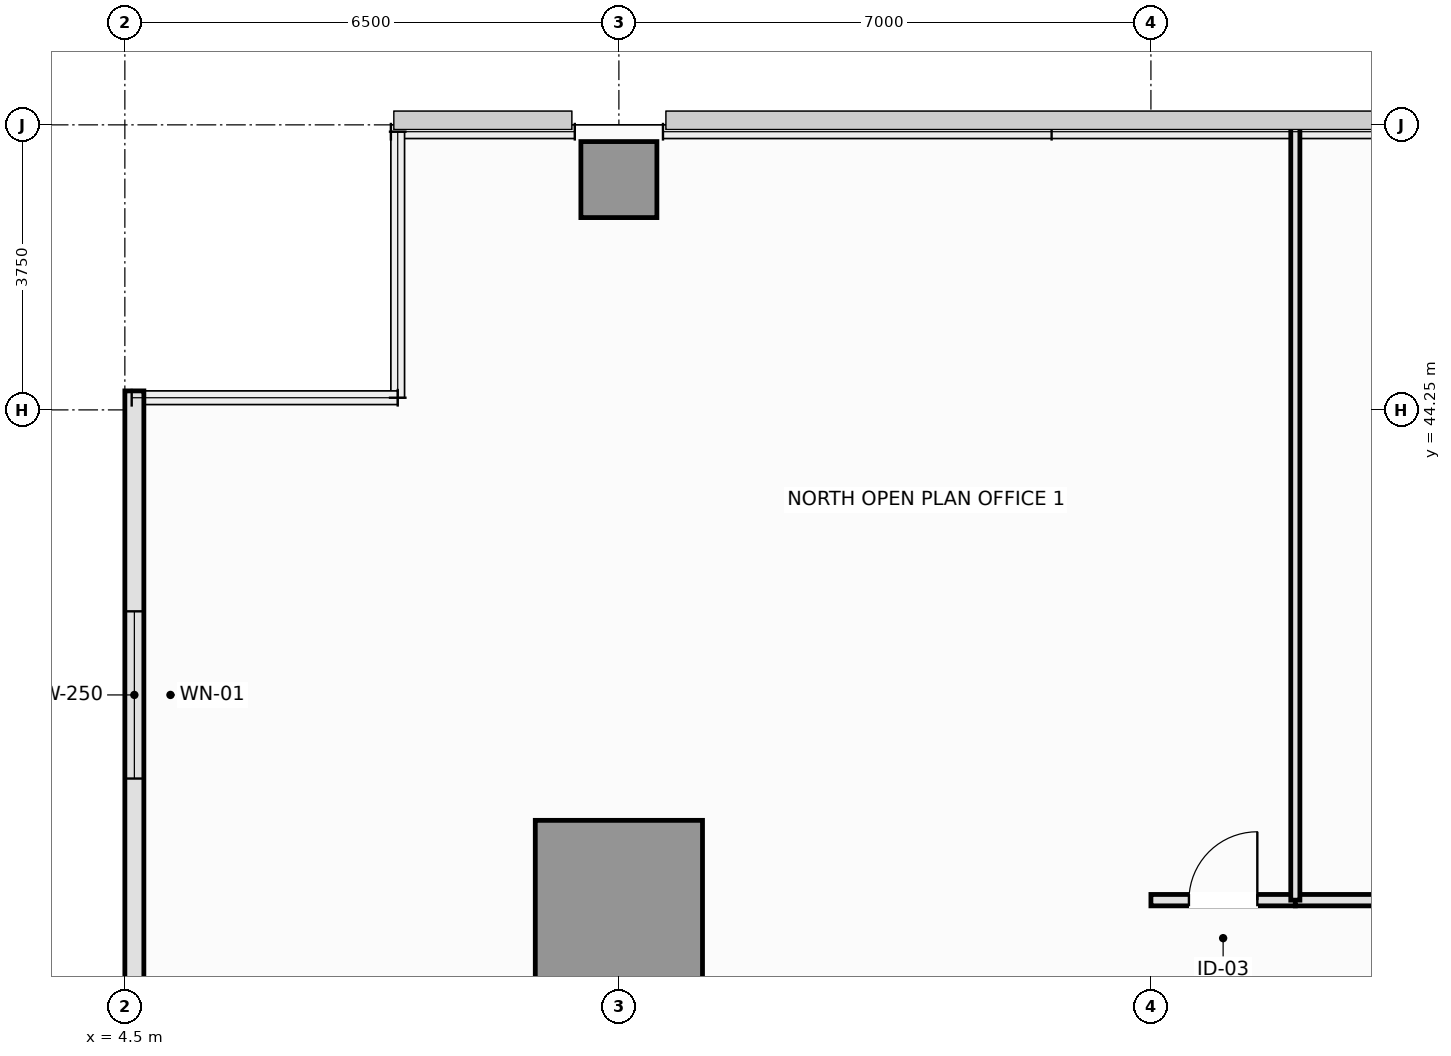
"""IFC4 building model, lengths in metres.
Left out: names, types, materials, properties, quantities, classifications, styles, units other than length and angle.
Written with IfcOpenShell. Run it as: python <this file> out.ifc"""

import sys

from ifc_helpers import new_model, si_unit, direction, frame, frame_2d, origin, origin_2d, place, context, subcontext, project, spatial, rectangle, extrude, element, fill, save


model = new_model("IFC4")
c1 = context("Model", 3, precision=1e-05, world=origin(), true_north=direction((0.0, 1.0)))
c2 = subcontext(c1, "Body", "Model", "MODEL_VIEW")
j1 = project(units=[si_unit("LENGTHUNIT", "METRE"), si_unit("PLANEANGLEUNIT", "RADIAN")], contexts=[c1])
p1 = place(None, origin())
s1 = spatial("IfcSite", under=j1, at=p1, CompositionType="ELEMENT")
p2 = place(p1, origin())
s2 = spatial("IfcBuilding", under=s1, at=p2, CompositionType="ELEMENT")
p3 = place(p2, frame((0.0, 0.0, 61.1)))
s3 = spatial("IfcBuildingStorey", under=s2, at=p3, CompositionType="ELEMENT", Elevation=61.1)
p4 = place(p3, frame((11.0, 37.75, 0.0), z_axis=(0.0, 0.0, 1.0), x_axis=(1.0, 0.0, 0.0)))
e1 = element("IfcColumn", 1, at=p4, inside=s3, PredefinedType="COLUMN", context=c2, shape_type="SweptSolid", body=[
    extrude(rectangle(XDim=2.2, YDim=2.2, at=origin_2d()), origin(), (0.0, 0.0, 1.0), 3.55),
])
p5 = place(p3, frame((11.0, 47.28, 0.0), z_axis=(0.0, 0.0, 1.0), x_axis=(1.0, 0.0, 0.0)))
e2 = element("IfcColumn", 2, at=p5, inside=s3, PredefinedType="COLUMN", context=c2, shape_type="SweptSolid", body=[
    extrude(rectangle(XDim=1.0, YDim=1.0, at=origin_2d()), origin(), (0.0, 0.0, 1.0), 3.55),
])
p6 = place(p3, frame((4.625, 44.5, 0.0), z_axis=(0.0, 0.0, 1.0), x_axis=(0.0, -1.0, 0.0)))
e3 = element("IfcWall", 3, at=p6, inside=s3, PredefinedType="SOLIDWALL", context=c2, shape_type="SweptSolid", body=[
    extrude(rectangle(XDim=8.0, YDim=0.25, at=frame_2d((4.0, 0.0))), origin(), (0.0, 0.0, 1.0), 3.37),
])
p7 = place(p6, frame((2.9, 0.0, 0.9)))
e4 = element("IfcOpeningElement", 4, at=p7, cuts=e3, PredefinedType="OPENING", context=c2, shape_type="SweptSolid", body=[
    extrude(rectangle(XDim=2.2, YDim=1.8, at=frame_2d((1.1, 0.9))), frame((0.0, 0.135, 0.0), z_axis=(0.0, -1.0, 0.0), x_axis=(1.0, 0.0, 0.0)), (0.0, 0.0, 1.0), 0.27),
])
p8 = place(p3, frame((18.0, 37.8, 0.0), z_axis=(0.0, 0.0, 1.0), x_axis=(1.0, 0.0, 0.0)))
e5 = element("IfcWall", 5, at=p8, inside=s3, PredefinedType="PARTITIONING", context=c2, shape_type="SweptSolid", body=[
    extrude(rectangle(XDim=1.9, YDim=0.15, at=frame_2d((0.95, 0.0))), origin(), (0.0, 0.0, 1.0), 2.72),
])
p9 = place(p8, frame((0.5, 0.0, 0.0)))
e6 = element("IfcOpeningElement", 6, at=p9, cuts=e5, PredefinedType="OPENING", context=c2, shape_type="SweptSolid", body=[
    extrude(rectangle(XDim=0.9, YDim=2.1, at=frame_2d((0.45, 1.05))), frame((0.0, 0.085, 0.0), z_axis=(0.0, -1.0, 0.0), x_axis=(1.0, 0.0, 0.0)), (0.0, 0.0, 1.0), 0.17),
])
p10 = place(p3, frame((19.9, 37.8, 0.0), z_axis=(0.0, 0.0, 1.0), x_axis=(1.0, 0.0, 0.0)))
e7 = element("IfcWall", 7, at=p10, inside=s3, PredefinedType="PARTITIONING", context=c2, shape_type="SweptSolid", body=[
    extrude(rectangle(XDim=3.7, YDim=0.15, at=frame_2d((1.85, 0.0))), origin(), (0.0, 0.0, 1.0), 2.72),
])
p11 = place(p10, frame((1.35, 0.0, 0.0)))
e8 = element("IfcOpeningElement", 8, at=p11, cuts=e7, PredefinedType="OPENING", context=c2, shape_type="SweptSolid", body=[
    extrude(rectangle(XDim=1.0, YDim=2.15, at=frame_2d((0.5, 1.075))), frame((0.0, 0.085, 0.0), z_axis=(0.0, -1.0, 0.0), x_axis=(1.0, 0.0, 0.0)), (0.0, 0.0, 1.0), 0.17),
])
p12 = place(p3, frame((19.9, 37.8, 0.0), z_axis=(0.0, 0.0, 1.0), x_axis=(0.0, 1.0, 0.0)))
e9 = element("IfcWall", 9, at=p12, inside=s3, PredefinedType="PARTITIONING", context=c2, shape_type="SweptSolid", body=[
    extrude(rectangle(XDim=10.19, YDim=0.12, at=frame_2d((5.095, 0.0))), origin(), (0.0, 0.0, 1.0), 3.37),
])
p13 = place(p7, origin())
e10 = element("IfcWindow", 10, at=p13, inside=s3, PartitioningType="SINGLE_PANEL", PredefinedType="WINDOW", context=c2, shape_type="SweptSolid", body=[
    extrude(rectangle(XDim=2.2, YDim=1.8, at=frame_2d((1.1, 0.9))), frame((0.0, 0.03, 0.0), z_axis=(0.0, -1.0, 0.0), x_axis=(1.0, 0.0, 0.0)), (0.0, 0.0, 1.0), 0.06),
])
fill(e4, e10)
p14 = place(p9, origin())
e11 = element("IfcDoor", 11, at=p14, inside=s3, OperationType="SINGLE_SWING_RIGHT", PredefinedType="DOOR", context=c2, shape_type="SweptSolid", body=[
    extrude(rectangle(XDim=0.9, YDim=2.1, at=frame_2d((0.45, 1.05))), frame((0.0, 0.025, 0.0), z_axis=(0.0, -1.0, 0.0), x_axis=(1.0, 0.0, 0.0)), (0.0, 0.0, 1.0), 0.05),
])
fill(e6, e11)
save(model, sys.argv[1])
